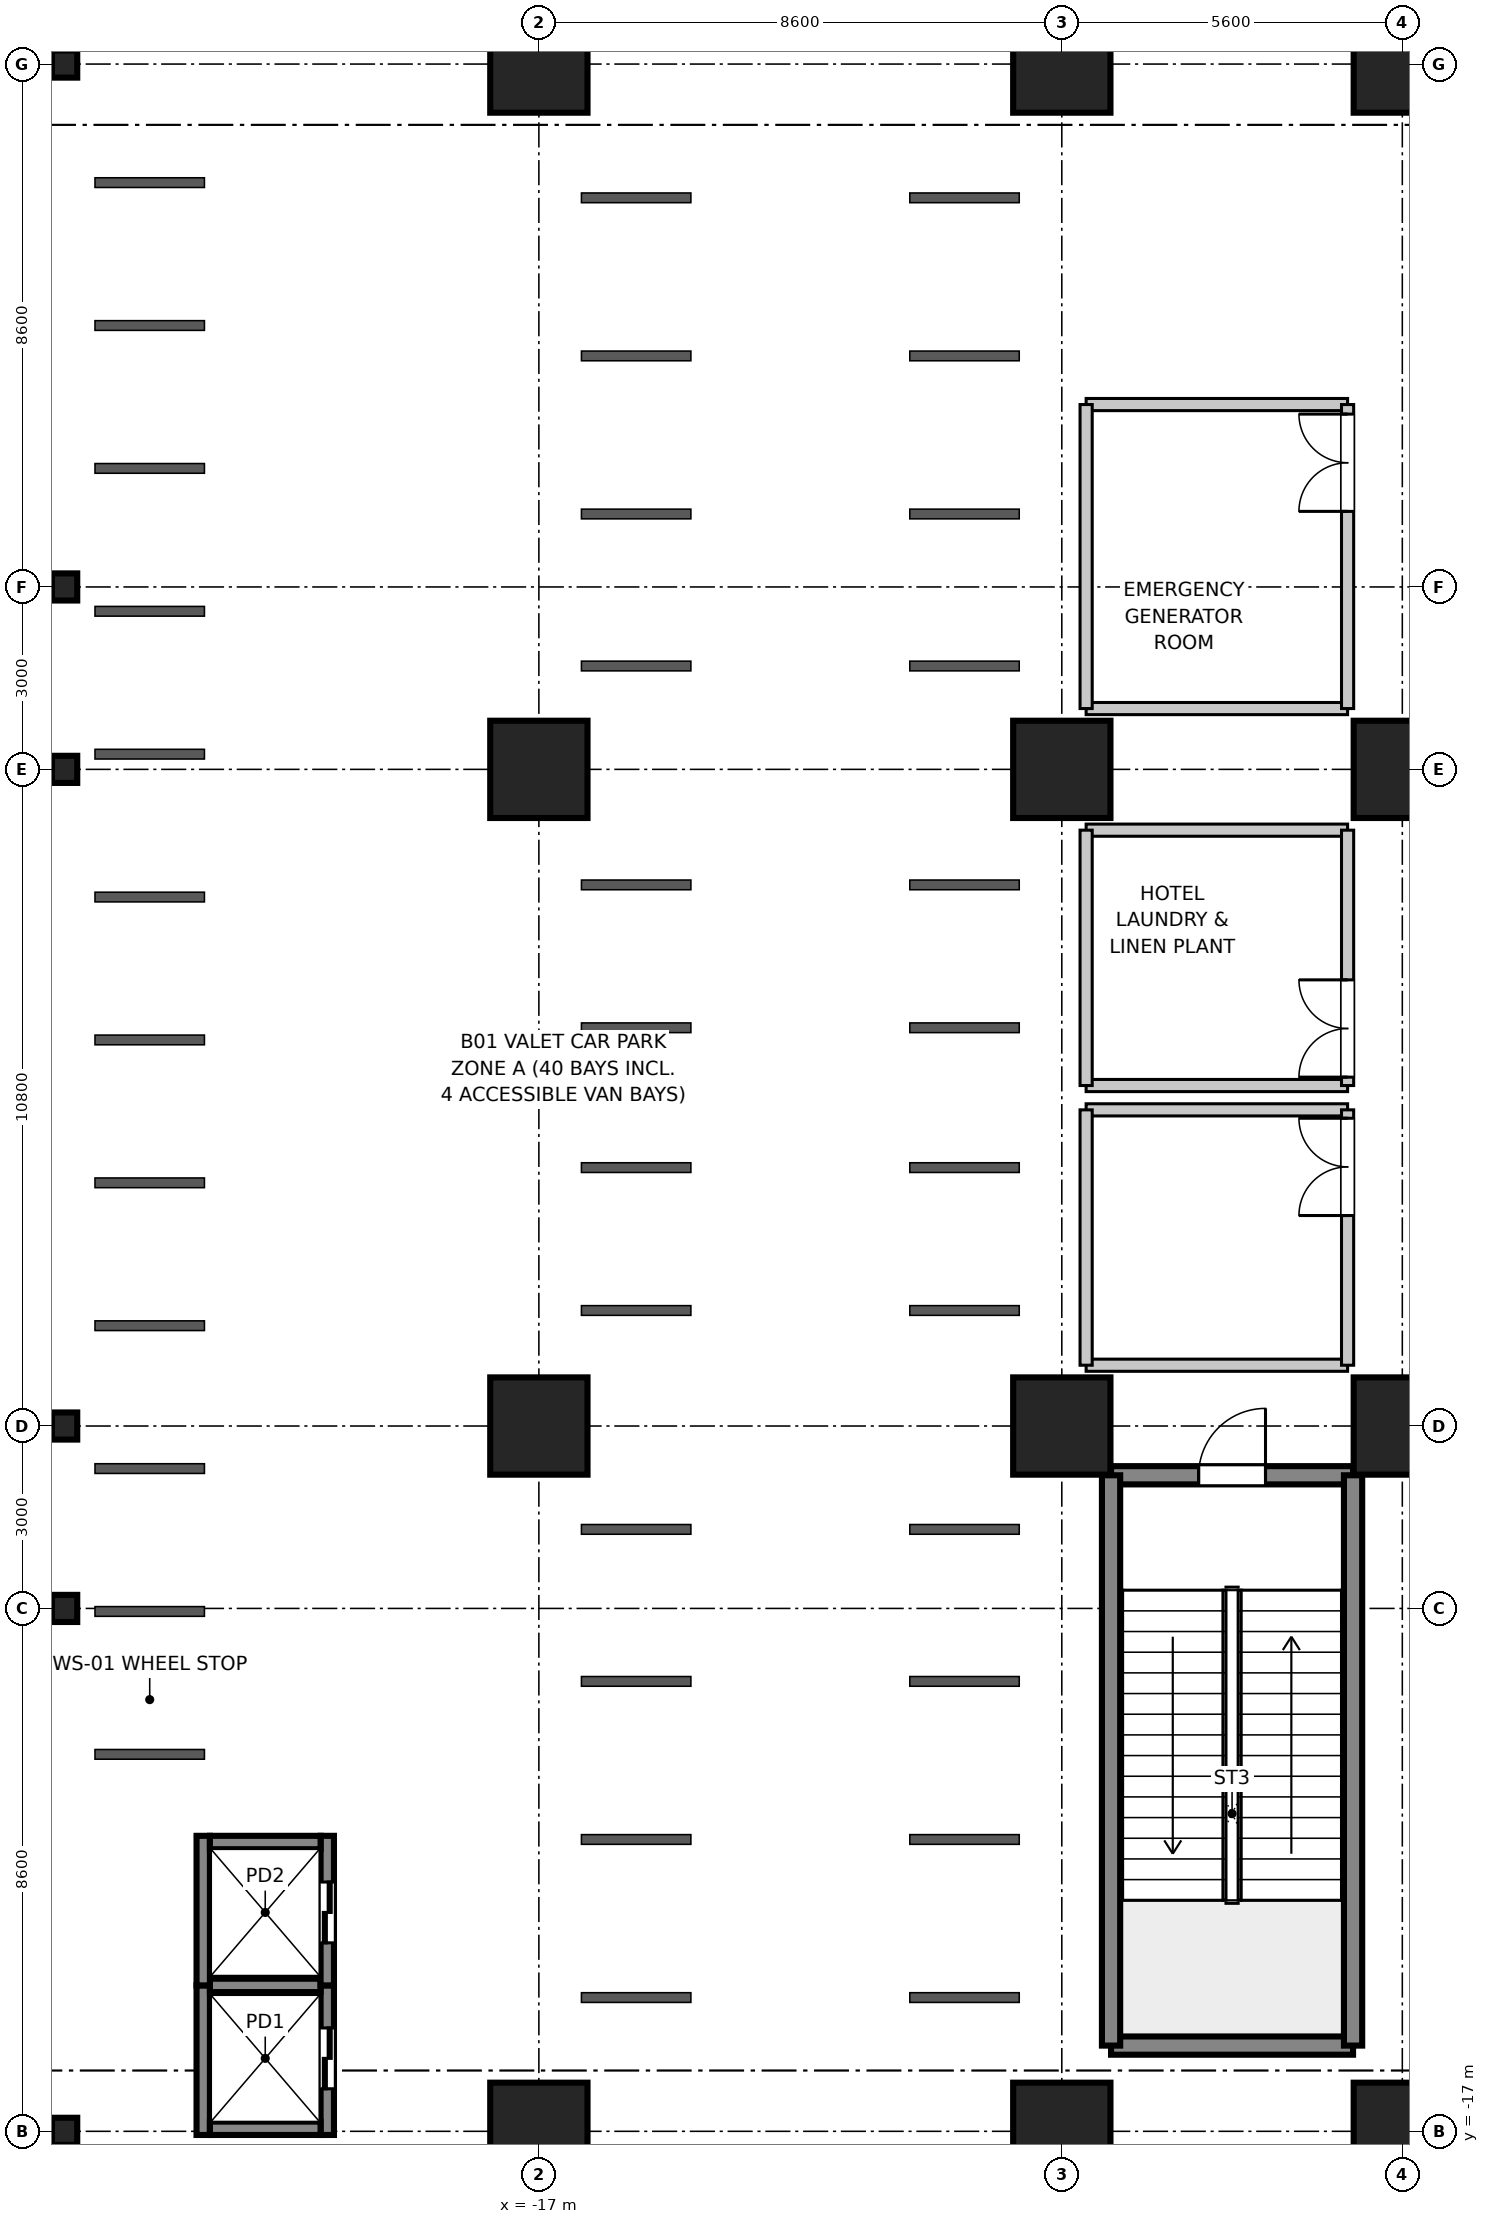
"""IFC4 building model, lengths in metres.
Left out: names, types, materials, properties, quantities, classifications, styles, units other than length and angle.
Written with IfcOpenShell. Run it as: python <this file> out.ifc"""

import sys

from ifc_helpers import new_model, si_unit, direction, frame, frame_2d, origin, origin_2d, place, context, subcontext, project, spatial, rectangle, i_section, extrude, source, transform, mapped, element, fill, save


model = new_model("IFC4")
c1 = context("Model", 3, precision=1e-05, world=origin(), true_north=direction((0.0, 1.0)))
c2 = subcontext(c1, "Body", "Model", "MODEL_VIEW")
j1 = project(units=[si_unit("LENGTHUNIT", "METRE"), si_unit("PLANEANGLEUNIT", "RADIAN")], contexts=[c1])
p1 = place(None, origin())
s1 = spatial("IfcSite", under=j1, at=p1, CompositionType="ELEMENT")
p2 = place(p1, origin())
s2 = spatial("IfcBuilding", under=s1, at=p2, CompositionType="ELEMENT")
p3 = place(p2, frame((0.0, 0.0, -5.4)))
s3 = spatial("IfcBuildingStorey", under=s2, at=p3, CompositionType="ELEMENT", Elevation=-5.4)
m1 = source(origin(), c2, "Body", "SweptSolid", [
    extrude(rectangle(XDim=1.6, YDim=1.6, at=origin_2d()), origin(), (0.0, 0.0, 1.0), 5.355),
])
for number, where, z_axis, x_axis in (
    (1, (-17.0, -17.0, 0.0), (0.0, 0.0, 1.0), (1.0, 0.0, 0.0)),
    (2, (-17.0, -5.4, 0.0), (0.0, 0.0, 1.0), (1.0, 0.0, 0.0)),
    (3, (-17.0, 5.4, 0.0), (0.0, 0.0, 1.0), (1.0, 0.0, 0.0)),
    (4, (-17.0, 17.0, 0.0), (0.0, 0.0, 1.0), (1.0, 0.0, 0.0)),
    (5, (-8.4, -17.0, 0.0), (0.0, 0.0, 1.0), (1.0, 0.0, 0.0)),
    (6, (-8.4, -5.4, 0.0), (0.0, 0.0, 1.0), (1.0, 0.0, 0.0)),
    (7, (-8.4, 5.4, 0.0), (0.0, 0.0, 1.0), (1.0, 0.0, 0.0)),
    (8, (-8.4, 17.0, 0.0), (0.0, 0.0, 1.0), (1.0, 0.0, 0.0)),
    (9, (-2.8, -17.0, 0.0), (0.0, 0.0, 1.0), (1.0, 0.0, 0.0)),
    (10, (-2.8, -5.4, 0.0), (0.0, 0.0, 1.0), (1.0, 0.0, 0.0)),
    (11, (-2.8, 5.4, 0.0), (0.0, 0.0, 1.0), (1.0, 0.0, 0.0)),
    (12, (-2.8, 17.0, 0.0), (0.0, 0.0, 1.0), (1.0, 0.0, 0.0)),
):
    element("IfcColumn", number, at=place(p3, frame(where, z_axis=z_axis, x_axis=x_axis)), inside=s3, PredefinedType="COLUMN", context=c2, shape_type="MappedRepresentation", body=[
        mapped(m1, transform((0.0, 0.0, 0.0), scale=1.0)),
    ])
m2 = source(origin(), c2, "Body", "SweptSolid", [
    extrude(i_section(OverallWidth=0.416, OverallDepth=0.446, WebThickness=0.025, FlangeThickness=0.04, at=origin_2d()), origin(), (0.0, 0.0, 1.0), 5.355),
])
for number, where, z_axis, x_axis in (
    (13, (-24.8, -17.0, 0.0), (0.0, 0.0, 1.0), (1.0, 0.0, 0.0)),
    (14, (-24.8, -8.4, 0.0), (0.0, 0.0, 1.0), (1.0, 0.0, 0.0)),
    (15, (-24.8, -5.4, 0.0), (0.0, 0.0, 1.0), (1.0, 0.0, 0.0)),
    (16, (-24.8, 5.4, 0.0), (0.0, 0.0, 1.0), (1.0, 0.0, 0.0)),
    (17, (-24.8, 8.4, 0.0), (0.0, 0.0, 1.0), (1.0, 0.0, 0.0)),
    (18, (-24.8, 17.0, 0.0), (0.0, 0.0, 1.0), (1.0, 0.0, 0.0)),
):
    element("IfcColumn", number, at=place(p3, frame(where, z_axis=z_axis, x_axis=x_axis)), inside=s3, PredefinedType="COLUMN", context=c2, shape_type="MappedRepresentation", body=[
        mapped(m2, transform((0.0, 0.0, 0.0), scale=1.0)),
    ])
m3 = source(origin(), c2, "Body", "SweptSolid", [
    extrude(rectangle(XDim=3.98, YDim=0.3, at=frame_2d((1.99, 0.0))), origin(), (0.0, 0.0, 1.0), 5.08),
])
p4 = place(p3, frame((-7.59, -15.59, 0.0), z_axis=(0.0, 0.0, 1.0), x_axis=(1.0, 0.0, 0.0)))
e19 = element("IfcWall", 19, at=p4, inside=s3, PredefinedType="SHEAR", context=c2, shape_type="MappedRepresentation", body=[
    mapped(m3, transform((0.0, 0.0, 0.0), scale=1.0)),
])
p5 = place(p3, frame((-7.59, -6.21, 0.0), z_axis=(0.0, 0.0, 1.0), x_axis=(1.0, 0.0, 0.0)))
e20 = element("IfcWall", 20, at=p5, inside=s3, PredefinedType="SHEAR", context=c2, shape_type="MappedRepresentation", body=[
    mapped(m3, transform((0.0, 0.0, 0.0), scale=1.0)),
])
p6 = place(p5, frame((1.44, 0.0, 0.0)))
e21 = element("IfcOpeningElement", 21, at=p6, cuts=e20, PredefinedType="OPENING", context=c2, shape_type="SweptSolid", body=[
    extrude(rectangle(XDim=1.1, YDim=2.15, at=frame_2d((0.55, 1.075))), frame((0.0, 0.16, 0.0), z_axis=(0.0, -1.0, 0.0), x_axis=(1.0, 0.0, 0.0)), (0.0, 0.0, 1.0), 0.32),
])
m4 = source(origin(), c2, "Body", "SweptSolid", [
    extrude(rectangle(XDim=9.38, YDim=0.3, at=frame_2d((4.69, 0.0))), origin(), (0.0, 0.0, 1.0), 5.08),
])
for number, where, z_axis, x_axis in (
    (22, (-7.59, -15.59, 0.0), (0.0, 0.0, 1.0), (0.0, 1.0, 0.0)),
    (23, (-3.61, -15.59, 0.0), (0.0, 0.0, 1.0), (0.0, 1.0, 0.0)),
):
    element("IfcWall", number, at=place(p3, frame(where, z_axis=z_axis, x_axis=x_axis)), inside=s3, PredefinedType="SHEAR", context=c2, shape_type="MappedRepresentation", body=[
        mapped(m4, transform((0.0, 0.0, 0.0), scale=1.0)),
    ])
m5 = source(origin(), c2, "Body", "SweptSolid", [
    extrude(rectangle(XDim=2.46, YDim=0.22, at=frame_2d((1.23, 0.0))), origin(), (0.0, 0.0, 1.0), 5.08),
])
p7 = place(p3, frame((-22.52, -17.06, 0.0), z_axis=(0.0, 0.0, 1.0), x_axis=(0.0, 1.0, 0.0)))
e24 = element("IfcWall", 24, at=p7, inside=s3, PredefinedType="SHEAR", context=c2, shape_type="MappedRepresentation", body=[
    mapped(m5, transform((0.0, 0.0, 0.0), scale=1.0)),
])
p8 = place(p3, frame((-20.48, -17.06, 0.0), z_axis=(0.0, 0.0, 1.0), x_axis=(0.0, 1.0, 0.0)))
e25 = element("IfcWall", 25, at=p8, inside=s3, PredefinedType="SHEAR", context=c2, shape_type="MappedRepresentation", body=[
    mapped(m5, transform((0.0, 0.0, 0.0), scale=1.0)),
])
p9 = place(p8, frame((0.76, 0.0, 0.0)))
e26 = element("IfcOpeningElement", 26, at=p9, cuts=e25, PredefinedType="OPENING", context=c2, shape_type="SweptSolid", body=[
    extrude(rectangle(XDim=1.0, YDim=2.2, at=frame_2d((0.5, 1.1))), frame((0.0, 0.12, 0.0), z_axis=(0.0, -1.0, 0.0), x_axis=(1.0, 0.0, 0.0)), (0.0, 0.0, 1.0), 0.24),
])
m6 = source(origin(), c2, "Body", "SweptSolid", [
    extrude(rectangle(XDim=1.82, YDim=0.22, at=frame_2d((0.91, 0.0))), origin(), (0.0, 0.0, 1.0), 5.08),
])
p10 = place(p3, frame((-22.41, -16.95, 0.0), z_axis=(0.0, 0.0, 1.0), x_axis=(1.0, 0.0, 0.0)))
e27 = element("IfcWall", 27, at=p10, inside=s3, PredefinedType="SHEAR", context=c2, shape_type="MappedRepresentation", body=[
    mapped(m6, transform((0.0, 0.0, 0.0), scale=1.0)),
])
m7 = source(origin(), c2, "Body", "SweptSolid", [
    extrude(rectangle(XDim=1.82, YDim=0.22, at=frame_2d((0.91, 0.0))), origin(), (0.0, 0.0, 1.0), 5.4),
])
p11 = place(p3, frame((-22.41, -14.6, 0.0), z_axis=(0.0, 0.0, 1.0), x_axis=(1.0, 0.0, 0.0)))
e28 = element("IfcWall", 28, at=p11, inside=s3, PredefinedType="SHEAR", context=c2, shape_type="MappedRepresentation", body=[
    mapped(m7, transform((0.0, 0.0, 0.0), scale=1.0)),
])
m8 = source(origin(), c2, "Body", "SweptSolid", [
    extrude(rectangle(XDim=2.46, YDim=0.22, at=frame_2d((1.23, 0.0))), origin(), (0.0, 0.0, 1.0), 5.08),
])
p12 = place(p3, frame((-22.52, -14.6, 0.0), z_axis=(0.0, 0.0, 1.0), x_axis=(0.0, 1.0, 0.0)))
e29 = element("IfcWall", 29, at=p12, inside=s3, PredefinedType="SHEAR", context=c2, shape_type="MappedRepresentation", body=[
    mapped(m8, transform((0.0, 0.0, 0.0), scale=1.0)),
])
p13 = place(p3, frame((-20.48, -14.6, 0.0), z_axis=(0.0, 0.0, 1.0), x_axis=(0.0, 1.0, 0.0)))
e30 = element("IfcWall", 30, at=p13, inside=s3, PredefinedType="SHEAR", context=c2, shape_type="MappedRepresentation", body=[
    mapped(m8, transform((0.0, 0.0, 0.0), scale=1.0)),
])
p14 = place(p13, frame((0.7, 0.0, 0.0)))
e31 = element("IfcOpeningElement", 31, at=p14, cuts=e30, PredefinedType="OPENING", context=c2, shape_type="SweptSolid", body=[
    extrude(rectangle(XDim=1.0, YDim=2.2, at=frame_2d((0.5, 1.1))), frame((0.0, 0.12, 0.0), z_axis=(0.0, -1.0, 0.0), x_axis=(1.0, 0.0, 0.0)), (0.0, 0.0, 1.0), 0.24),
])
p15 = place(p3, frame((-22.41, -12.25, 0.0), z_axis=(0.0, 0.0, 1.0), x_axis=(1.0, 0.0, 0.0)))
e32 = element("IfcWall", 32, at=p15, inside=s3, PredefinedType="SHEAR", context=c2, shape_type="MappedRepresentation", body=[
    mapped(m6, transform((0.0, 0.0, 0.0), scale=1.0)),
])
m9 = source(origin(), c2, "Body", "SweptSolid", [
    extrude(rectangle(XDim=4.3, YDim=0.2, at=frame_2d((2.15, 0.0))), origin(), (0.0, 0.0, 1.0), 3.4),
])
for number, where, z_axis, x_axis in (
    (33, (-8.0, -4.4, 0.0), (0.0, 0.0, 1.0), (1.0, 0.0, 0.0)),
    (34, (-8.0, -0.2, 0.0), (0.0, 0.0, 1.0), (1.0, 0.0, 0.0)),
):
    element("IfcWall", number, at=place(p3, frame(where, z_axis=z_axis, x_axis=x_axis)), inside=s3, PredefinedType="PARTITIONING", context=c2, shape_type="MappedRepresentation", body=[
        mapped(m9, transform((0.0, 0.0, 0.0), scale=1.0)),
    ])
m10 = source(origin(), c2, "Body", "SweptSolid", [
    extrude(rectangle(XDim=4.2, YDim=0.2, at=frame_2d((2.1, 0.0))), origin(), (0.0, 0.0, 1.0), 3.4),
])
p16 = place(p3, frame((-8.0, -4.4, 0.0), z_axis=(0.0, 0.0, 1.0), x_axis=(0.0, 1.0, 0.0)))
e35 = element("IfcWall", 35, at=p16, inside=s3, PredefinedType="PARTITIONING", context=c2, shape_type="MappedRepresentation", body=[
    mapped(m10, transform((0.0, 0.0, 0.0), scale=1.0)),
])
p17 = place(p3, frame((-3.7, -4.4, 0.0), z_axis=(0.0, 0.0, 1.0), x_axis=(0.0, 1.0, 0.0)))
e36 = element("IfcWall", 36, at=p17, inside=s3, PredefinedType="PARTITIONING", context=c2, shape_type="MappedRepresentation", body=[
    mapped(m10, transform((0.0, 0.0, 0.0), scale=1.0)),
])
p18 = place(p17, frame((2.462, 0.0, 0.0)))
e37 = element("IfcOpeningElement", 37, at=p18, cuts=e36, PredefinedType="OPENING", context=c2, shape_type="SweptSolid", body=[
    extrude(rectangle(XDim=1.6, YDim=2.15, at=frame_2d((0.8, 1.075))), frame((0.0, 0.11, 0.0), z_axis=(0.0, -1.0, 0.0), x_axis=(1.0, 0.0, 0.0)), (0.0, 0.0, 1.0), 0.22),
])
for number, where, z_axis, x_axis in (
    (38, (-8.0, 0.2, 0.0), (0.0, 0.0, 1.0), (1.0, 0.0, 0.0)),
    (39, (-8.0, 4.4, 0.0), (0.0, 0.0, 1.0), (1.0, 0.0, 0.0)),
):
    element("IfcWall", number, at=place(p3, frame(where, z_axis=z_axis, x_axis=x_axis)), inside=s3, PredefinedType="PARTITIONING", context=c2, shape_type="MappedRepresentation", body=[
        mapped(m9, transform((0.0, 0.0, 0.0), scale=1.0)),
    ])
p19 = place(p3, frame((-8.0, 0.2, 0.0), z_axis=(0.0, 0.0, 1.0), x_axis=(0.0, 1.0, 0.0)))
e40 = element("IfcWall", 40, at=p19, inside=s3, PredefinedType="PARTITIONING", context=c2, shape_type="MappedRepresentation", body=[
    mapped(m10, transform((0.0, 0.0, 0.0), scale=1.0)),
])
p20 = place(p3, frame((-3.7, 0.2, 0.0), z_axis=(0.0, 0.0, 1.0), x_axis=(0.0, 1.0, 0.0)))
e41 = element("IfcWall", 41, at=p20, inside=s3, PredefinedType="PARTITIONING", context=c2, shape_type="MappedRepresentation", body=[
    mapped(m10, transform((0.0, 0.0, 0.0), scale=1.0)),
])
p21 = place(p20, frame((0.138, 0.0, 0.0)))
e42 = element("IfcOpeningElement", 42, at=p21, cuts=e41, PredefinedType="OPENING", context=c2, shape_type="SweptSolid", body=[
    extrude(rectangle(XDim=1.6, YDim=2.15, at=frame_2d((0.8, 1.075))), frame((0.0, 0.11, 0.0), z_axis=(0.0, -1.0, 0.0), x_axis=(1.0, 0.0, 0.0)), (0.0, 0.0, 1.0), 0.22),
])
for number, where, z_axis, x_axis in (
    (43, (-8.0, 6.4, 0.0), (0.0, 0.0, 1.0), (1.0, 0.0, 0.0)),
    (44, (-8.0, 11.4, 0.0), (0.0, 0.0, 1.0), (1.0, 0.0, 0.0)),
):
    element("IfcWall", number, at=place(p3, frame(where, z_axis=z_axis, x_axis=x_axis)), inside=s3, PredefinedType="PARTITIONING", context=c2, shape_type="MappedRepresentation", body=[
        mapped(m9, transform((0.0, 0.0, 0.0), scale=1.0)),
    ])
m11 = source(origin(), c2, "Body", "SweptSolid", [
    extrude(rectangle(XDim=5.0, YDim=0.2, at=frame_2d((2.5, 0.0))), origin(), (0.0, 0.0, 1.0), 3.4),
])
p22 = place(p3, frame((-8.0, 6.4, 0.0), z_axis=(0.0, 0.0, 1.0), x_axis=(0.0, 1.0, 0.0)))
e45 = element("IfcWall", 45, at=p22, inside=s3, PredefinedType="PARTITIONING", context=c2, shape_type="MappedRepresentation", body=[
    mapped(m11, transform((0.0, 0.0, 0.0), scale=1.0)),
])
p23 = place(p3, frame((-3.7, 6.4, 0.0), z_axis=(0.0, 0.0, 1.0), x_axis=(0.0, 1.0, 0.0)))
e46 = element("IfcWall", 46, at=p23, inside=s3, PredefinedType="PARTITIONING", context=c2, shape_type="MappedRepresentation", body=[
    mapped(m11, transform((0.0, 0.0, 0.0), scale=1.0)),
])
p24 = place(p23, frame((3.243, 0.0, 0.0)))
e47 = element("IfcOpeningElement", 47, at=p24, cuts=e46, PredefinedType="OPENING", context=c2, shape_type="SweptSolid", body=[
    extrude(rectangle(XDim=1.6, YDim=2.15, at=frame_2d((0.8, 1.075))), frame((0.0, 0.11, 0.0), z_axis=(0.0, -1.0, 0.0), x_axis=(1.0, 0.0, 0.0)), (0.0, 0.0, 1.0), 0.22),
])
m12 = source(origin(), c2, "Body", "SweptSolid", [
    extrude(rectangle(XDim=1.1, YDim=2.15, at=frame_2d((0.55, 1.075))), frame((0.0, 0.025, 0.0), z_axis=(0.0, -1.0, 0.0), x_axis=(1.0, 0.0, 0.0)), (0.0, 0.0, 1.0), 0.05),
])
p25 = place(p6, frame((1.1, 0.0, 0.0), z_axis=(0.0, 0.0, 1.0), x_axis=(-1.0, 0.0, 0.0)))
e48 = element("IfcDoor", 48, at=p25, inside=s3, OperationType="SINGLE_SWING_RIGHT", PredefinedType="DOOR", context=c2, shape_type="MappedRepresentation", body=[
    mapped(m12, transform((0.0, 0.0, 0.0), scale=1.0)),
])
fill(e21, e48)
m13 = source(origin(), c2, "Body", "SweptSolid", [
    extrude(rectangle(XDim=1.0, YDim=2.2, at=frame_2d((0.5, 1.1))), frame((0.0, 0.025, 0.0), z_axis=(0.0, -1.0, 0.0), x_axis=(1.0, 0.0, 0.0)), (0.0, 0.0, 1.0), 0.05),
])
p26 = place(p9, frame((1.0, 0.0, 0.0), z_axis=(0.0, 0.0, 1.0), x_axis=(-1.0, 0.0, 0.0)))
e49 = element("IfcDoor", 49, at=p26, inside=s3, OperationType="DOUBLE_DOOR_SLIDING", PredefinedType="DOOR", context=c2, shape_type="MappedRepresentation", body=[
    mapped(m13, transform((0.0, 0.0, 0.0), scale=1.0)),
])
fill(e26, e49)
p27 = place(p14, frame((1.0, 0.0, 0.0), z_axis=(0.0, 0.0, 1.0), x_axis=(-1.0, 0.0, 0.0)))
e50 = element("IfcDoor", 50, at=p27, inside=s3, OperationType="DOUBLE_DOOR_SLIDING", PredefinedType="DOOR", context=c2, shape_type="MappedRepresentation", body=[
    mapped(m13, transform((0.0, 0.0, 0.0), scale=1.0)),
])
fill(e31, e50)
m14 = source(origin(), c2, "Body", "SweptSolid", [
    extrude(rectangle(XDim=1.6, YDim=2.15, at=frame_2d((0.8, 1.075))), frame((0.0, 0.025, 0.0), z_axis=(0.0, -1.0, 0.0), x_axis=(1.0, 0.0, 0.0)), (0.0, 0.0, 1.0), 0.05),
])
p28 = place(p18, origin())
e51 = element("IfcDoor", 51, at=p28, inside=s3, OperationType="DOUBLE_DOOR_SINGLE_SWING", PredefinedType="DOOR", context=c2, shape_type="MappedRepresentation", body=[
    mapped(m14, transform((0.0, 0.0, 0.0), scale=1.0)),
])
fill(e37, e51)
p29 = place(p21, origin())
e52 = element("IfcDoor", 52, at=p29, inside=s3, OperationType="DOUBLE_DOOR_SINGLE_SWING", PredefinedType="DOOR", context=c2, shape_type="MappedRepresentation", body=[
    mapped(m14, transform((0.0, 0.0, 0.0), scale=1.0)),
])
fill(e42, e52)
p30 = place(p24, origin())
e53 = element("IfcDoor", 53, at=p30, inside=s3, OperationType="DOUBLE_DOOR_SINGLE_SWING", PredefinedType="DOOR", context=c2, shape_type="MappedRepresentation", body=[
    mapped(m14, transform((0.0, 0.0, 0.0), scale=1.0)),
])
fill(e47, e53)
save(model, sys.argv[1])
